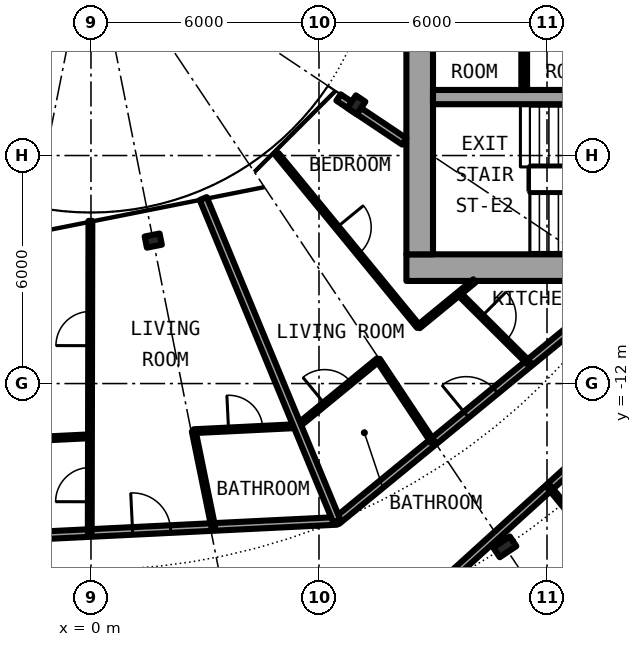
"""IFC4 building model, lengths in metres.
Left out: names, types, materials, properties, quantities, classifications, styles, units other than length and angle.
Written with IfcOpenShell. Run it as: python <this file> out.ifc"""

import sys

from ifc_helpers import new_model, si_unit, direction, frame, frame_2d, origin, origin_2d, place, context, subcontext, project, spatial, rectangle, i_section, extrude, element, fill, save


model = new_model("IFC4")
c1 = context("Model", 3, precision=1e-05, world=origin(), true_north=direction((0.0, 1.0)))
c2 = subcontext(c1, "Body", "Model", "MODEL_VIEW")
j1 = project(units=[si_unit("LENGTHUNIT", "METRE"), si_unit("PLANEANGLEUNIT", "RADIAN")], contexts=[c1])
p1 = place(None, origin())
s1 = spatial("IfcSite", under=j1, at=p1, CompositionType="ELEMENT")
p2 = place(p1, origin())
s2 = spatial("IfcBuilding", under=s1, at=p2, CompositionType="ELEMENT")
p3 = place(p2, frame((0.0, 0.0, 81.9)))
s3 = spatial("IfcBuildingStorey", under=s2, at=p3, CompositionType="ELEMENT", Elevation=81.9)
p4 = place(p3, frame((10.889, -16.297, 0.0), z_axis=(0.0, 0.0, 1.0), x_axis=(0.55557023302, -0.831469612303, 0.0)))
e1 = element("IfcColumn", 1, at=p4, inside=s3, PredefinedType="COLUMN", context=c2, shape_type="SweptSolid", body=[
    extrude(i_section(OverallWidth=0.306, OverallDepth=0.524, WebThickness=0.021, FlangeThickness=0.04, FilletRadius=0.027, at=origin_2d()), origin(), (0.0, 0.0, 1.0), 3.05),
])
for number, where, z_axis, x_axis in (
    (2, (1.639, -8.239, 0.0), (0.0, 0.0, 1.0), (0.195, -0.981, 0.0)),
    (3, (6.984, -4.667, 0.0), (0.0, 0.0, 1.0), (0.831, -0.556, 0.0)),
):
    element("IfcColumn", number, at=place(p3, frame(where, z_axis=z_axis, x_axis=x_axis)), inside=s3, PredefinedType="COLUMN", context=c2, shape_type="SweptSolid", body=[
        extrude(i_section(OverallWidth=0.3, OverallDepth=0.4, WebThickness=0.013, FlangeThickness=0.024, FilletRadius=0.027, at=origin_2d()), origin(), (0.0, 0.0, 1.0), 3.05),
    ])
p5 = place(p3, frame((8.3, -8.95, 0.0), z_axis=(0.0, 0.0, 1.0), x_axis=(1.0, 0.0, 0.0)))
e4 = element("IfcWall", 4, at=p5, inside=s3, PredefinedType="SHEAR", context=c2, shape_type="SweptSolid", body=[
    extrude(rectangle(XDim=14.0, YDim=0.7, at=frame_2d((7.0, 0.0))), origin(), (0.0, 0.0, 1.0), 3.05),
])
p6 = place(p5, frame((11.575, 0.0, 0.0)))
e5 = element("IfcOpeningElement", 5, at=p6, cuts=e4, PredefinedType="OPENING", context=c2, shape_type="SweptSolid", body=[
    extrude(rectangle(XDim=1.2, YDim=2.3, at=frame_2d((0.6, 1.15))), frame((0.0, 0.36, 0.0), z_axis=(0.0, -1.0, 0.0), x_axis=(1.0, 0.0, 0.0)), (0.0, 0.0, 1.0), 0.72),
])
p7 = place(p3, frame((8.65, -8.6, 0.0), z_axis=(0.0, 0.0, 1.0), x_axis=(0.0, 1.0, 0.0)))
e6 = element("IfcWall", 6, at=p7, inside=s3, PredefinedType="SHEAR", context=c2, shape_type="SweptSolid", body=[
    extrude(rectangle(XDim=17.2, YDim=0.7, at=frame_2d((8.6, 0.0))), origin(), (0.0, 0.0, 1.0), 3.05),
])
p8 = place(p7, frame((7.4, 0.0, 0.1)))
e7 = element("IfcOpeningElement", 7, at=p8, cuts=e6, PredefinedType="OPENING", context=c2, shape_type="SweptSolid", body=[
    extrude(rectangle(XDim=2.4, YDim=2.2, at=frame_2d((1.2, 1.1))), frame((0.0, 0.36, 0.0), z_axis=(0.0, -1.0, 0.0), x_axis=(1.0, 0.0, 0.0)), (0.0, 0.0, 1.0), 0.72),
])
p9 = place(p3, frame((9.0, -4.462, 0.0), z_axis=(0.0, 0.0, 1.0), x_axis=(1.0, 0.0, 0.0)))
e8 = element("IfcWall", 8, at=p9, inside=s3, PredefinedType="SHEAR", context=c2, shape_type="SweptSolid", body=[
    extrude(rectangle(XDim=10.15, YDim=0.375, at=frame_2d((5.075, 0.0))), origin(), (0.0, 0.0, 1.0), 3.05),
])
p10 = place(p3, frame((11.4, -1.825, 0.0), z_axis=(0.0, 0.0, 1.0), x_axis=(0.0, -1.0, 0.0)))
e9 = element("IfcWall", 9, at=p10, inside=s3, PredefinedType="PARTITIONING", context=c2, shape_type="SweptSolid", body=[
    extrude(rectangle(XDim=2.45, YDim=0.15, at=frame_2d((1.225, 0.0))), origin(), (0.0, 0.0, 1.0), 2.7),
])
p11 = place(p3, frame((10.513, -19.668, 0.0), z_axis=(0.0, 0.0, 1.0), x_axis=(0.74092137325, 0.671591779775, 0.0)))
e10 = element("IfcWall", 10, at=p11, inside=s3, PredefinedType="PARTITIONING", context=c2, shape_type="SweptSolid", body=[
    extrude(rectangle(XDim=4.342, YDim=0.1, at=frame_2d((2.171, 0.0))), origin(), (0.0, 0.0, 1.0), 2.7),
])
p12 = place(p3, frame((9.239, -17.286, 0.0), z_axis=(0.0, 0.0, 1.0), x_axis=(0.740909940942, 0.671604392044, 0.0)))
e11 = element("IfcWall", 11, at=p12, inside=s3, PredefinedType="PARTITIONING", context=c2, shape_type="SweptSolid", body=[
    extrude(rectangle(XDim=9.367, YDim=0.2, at=frame_2d((4.683, 0.0))), origin(), (0.0, 0.0, 1.0), 2.38),
])
p13 = place(p12, frame((5.215, 0.0, 0.0)))
e12 = element("IfcOpeningElement", 12, at=p13, cuts=e11, PredefinedType="OPENING", context=c2, shape_type="SweptSolid", body=[
    extrude(rectangle(XDim=1.0, YDim=2.3, at=frame_2d((0.5, 1.15))), frame((0.0, 0.11, 0.0), z_axis=(0.0, -1.0, 0.0), x_axis=(1.0, 0.0, 0.0)), (0.0, 0.0, 1.0), 0.22),
])
p14 = place(p3, frame((6.467, -15.614, 0.0), z_axis=(0.0, 0.0, 1.0), x_axis=(0.773074935257, 0.634314704605, 0.0)))
e13 = element("IfcWall", 13, at=p14, inside=s3, PredefinedType="PARTITIONING", context=c2, shape_type="SweptSolid", body=[
    extrude(rectangle(XDim=9.809, YDim=0.2, at=frame_2d((4.904, 0.0))), origin(), (0.0, 0.0, 1.0), 2.7),
])
p15 = place(p14, frame((4.407, 0.0, 0.0)))
e14 = element("IfcOpeningElement", 14, at=p15, cuts=e13, PredefinedType="OPENING", context=c2, shape_type="SweptSolid", body=[
    extrude(rectangle(XDim=1.0, YDim=2.3, at=frame_2d((0.5, 1.15))), frame((0.0, 0.11, 0.0), z_axis=(0.0, -1.0, 0.0), x_axis=(1.0, 0.0, 0.0)), (0.0, 0.0, 1.0), 0.22),
])
p16 = place(p3, frame((-4.906, -16.172, 0.0), z_axis=(0.0, 0.0, 1.0), x_axis=(0.998798520108, 0.049005267363, 0.0)))
e15 = element("IfcWall", 15, at=p16, inside=s3, PredefinedType="PARTITIONING", context=c2, shape_type="SweptSolid", body=[
    extrude(rectangle(XDim=11.389, YDim=0.2, at=frame_2d((5.694, 0.0))), origin(), (0.0, 0.0, 1.0), 2.7),
])
p17 = place(p16, frame((6.008, 0.0, 0.0)))
e16 = element("IfcOpeningElement", 16, at=p17, cuts=e15, PredefinedType="OPENING", context=c2, shape_type="SweptSolid", body=[
    extrude(rectangle(XDim=1.0, YDim=2.3, at=frame_2d((0.5, 1.15))), frame((0.0, 0.11, 0.0), z_axis=(0.0, -1.0, 0.0), x_axis=(1.0, 0.0, 0.0)), (0.0, 0.0, 1.0), 0.22),
])
p18 = place(p3, frame((5.434, -13.119, 0.0), z_axis=(0.0, 0.0, 1.0), x_axis=(0.773049907698, 0.634345205868, 0.0)))
e17 = element("IfcWall", 17, at=p18, inside=s3, PredefinedType="PARTITIONING", context=c2, shape_type="SweptSolid", body=[
    extrude(rectangle(XDim=2.748, YDim=0.1, at=frame_2d((1.374, 0.0))), origin(), (0.0, 0.0, 1.0), 2.7),
])
p19 = place(p18, frame((0.924, 0.0, 0.0)))
e18 = element("IfcOpeningElement", 18, at=p19, cuts=e17, PredefinedType="OPENING", context=c2, shape_type="SweptSolid", body=[
    extrude(rectangle(XDim=0.9, YDim=2.3, at=frame_2d((0.45, 1.15))), frame((0.0, 0.06, 0.0), z_axis=(0.0, -1.0, 0.0), x_axis=(1.0, 0.0, 0.0)), (0.0, 0.0, 1.0), 0.12),
])
p20 = place(p3, frame((8.62, -10.505, 0.0), z_axis=(0.0, 0.0, 1.0), x_axis=(0.772957368531, 0.6344579627, 0.0)))
e19 = element("IfcWall", 19, at=p20, inside=s3, PredefinedType="PARTITIONING", context=c2, shape_type="SweptSolid", body=[
    extrude(rectangle(XDim=1.906, YDim=0.1, at=frame_2d((0.953, 0.0))), origin(), (0.0, 0.0, 1.0), 2.7),
])
p21 = place(p3, frame((-4.125, -13.588, 0.0), z_axis=(0.0, 0.0, 1.0), x_axis=(0.998798386358, 0.049007993321, 0.0)))
e20 = element("IfcWall", 20, at=p21, inside=s3, PredefinedType="PARTITIONING", context=c2, shape_type="SweptSolid", body=[
    extrude(rectangle(XDim=4.1, YDim=0.1, at=frame_2d((2.05, 0.0))), origin(), (0.0, 0.0, 1.0), 2.7),
])
p22 = place(p3, frame((2.704, -13.253, 0.0), z_axis=(0.0, 0.0, 1.0), x_axis=(0.998796928508, 0.049037695739, 0.0)))
e21 = element("IfcWall", 21, at=p22, inside=s3, PredefinedType="PARTITIONING", context=c2, shape_type="SweptSolid", body=[
    extrude(rectangle(XDim=2.733, YDim=0.1, at=frame_2d((1.367, 0.0))), origin(), (0.0, 0.0, 1.0), 2.7),
])
p23 = place(p22, frame((0.917, 0.0, 0.0)))
e22 = element("IfcOpeningElement", 22, at=p23, cuts=e21, PredefinedType="OPENING", context=c2, shape_type="SweptSolid", body=[
    extrude(rectangle(XDim=0.9, YDim=2.3, at=frame_2d((0.45, 1.15))), frame((0.0, 0.06, 0.0), z_axis=(0.0, -1.0, 0.0), x_axis=(1.0, 0.0, 0.0)), (0.0, 0.0, 1.0), 0.12),
])
p24 = place(p3, frame((6.513, -4.472, 0.0), z_axis=(0.0, 0.0, 1.0), x_axis=(0.831382204863, -0.555701025225, 0.0)))
e23 = element("IfcWall", 23, at=p24, inside=s3, PredefinedType="PARTITIONING", context=c2, shape_type="SweptSolid", body=[
    extrude(rectangle(XDim=2.082, YDim=0.2, at=frame_2d((1.041, 0.0))), origin(), (0.0, 0.0, 1.0), 2.7),
])
p25 = place(p3, frame((-0.032, -15.933, 0.0), z_axis=(0.0, 0.0, 1.0), x_axis=(0.002080789764, 0.999997835155, 0.0)))
e24 = element("IfcWall", 24, at=p25, inside=s3, PredefinedType="PARTITIONING", context=c2, shape_type="SweptSolid", body=[
    extrude(rectangle(XDim=8.213, YDim=0.1, at=frame_2d((4.106, 0.0))), origin(), (0.0, 0.0, 1.0), 2.7),
])
p26 = place(p25, frame((0.823, 0.0, 0.0)))
e25 = element("IfcOpeningElement", 25, at=p26, cuts=e24, PredefinedType="OPENING", context=c2, shape_type="SweptSolid", body=[
    extrude(rectangle(XDim=0.9, YDim=2.3, at=frame_2d((0.45, 1.15))), frame((0.0, 0.06, 0.0), z_axis=(0.0, -1.0, 0.0), x_axis=(1.0, 0.0, 0.0)), (0.0, 0.0, 1.0), 0.12),
])
p27 = place(p25, frame((4.93, 0.0, 0.0)))
e26 = element("IfcOpeningElement", 26, at=p27, cuts=e24, PredefinedType="OPENING", context=c2, shape_type="SweptSolid", body=[
    extrude(rectangle(XDim=0.9, YDim=2.3, at=frame_2d((0.45, 1.15))), frame((0.0, 0.06, 0.0), z_axis=(0.0, -1.0, 0.0), x_axis=(1.0, 0.0, 0.0)), (0.0, 0.0, 1.0), 0.12),
])
p28 = place(p3, frame((2.704, -13.253, 0.0), z_axis=(0.0, 0.0, 1.0), x_axis=(0.199820523641, -0.979832515449, 0.0)))
e27 = element("IfcWall", 27, at=p28, inside=s3, PredefinedType="PARTITIONING", context=c2, shape_type="SweptSolid", body=[
    extrude(rectangle(XDim=2.572, YDim=0.1, at=frame_2d((1.286, 0.0))), origin(), (0.0, 0.0, 1.0), 2.7),
])
p29 = place(p3, frame((2.954, -7.132, 0.0), z_axis=(0.0, 0.0, 1.0), x_axis=(0.382646942224, -0.923894646378, 0.0)))
e28 = element("IfcWall", 28, at=p29, inside=s3, PredefinedType="PARTITIONING", context=c2, shape_type="SweptSolid", body=[
    extrude(rectangle(XDim=9.181, YDim=0.2, at=frame_2d((4.59, 0.0))), origin(), (0.0, 0.0, 1.0), 2.7),
])
p30 = place(p3, frame((4.898, -5.968, 0.0), z_axis=(0.0, 0.0, 1.0), x_axis=(0.634358693064, -0.773038840249, 0.0)))
e29 = element("IfcWall", 29, at=p30, inside=s3, PredefinedType="PARTITIONING", context=c2, shape_type="SweptSolid", body=[
    extrude(rectangle(XDim=5.868, YDim=0.1, at=frame_2d((2.934, 0.0))), origin(), (0.0, 0.0, 1.0), 2.7),
])
p31 = place(p30, frame((2.484, 0.0, 0.0)))
e30 = element("IfcOpeningElement", 30, at=p31, cuts=e29, PredefinedType="OPENING", context=c2, shape_type="SweptSolid", body=[
    extrude(rectangle(XDim=0.9, YDim=2.3, at=frame_2d((0.45, 1.15))), frame((0.0, 0.06, 0.0), z_axis=(0.0, -1.0, 0.0), x_axis=(1.0, 0.0, 0.0)), (0.0, 0.0, 1.0), 0.12),
])
p32 = place(p3, frame((7.558, -11.376, 0.0), z_axis=(0.0, 0.0, 1.0), x_axis=(0.553615197403, -0.83277260594, 0.0)))
e31 = element("IfcWall", 31, at=p32, inside=s3, PredefinedType="PARTITIONING", context=c2, shape_type="SweptSolid", body=[
    extrude(rectangle(XDim=2.597, YDim=0.1, at=frame_2d((1.299, 0.0))), origin(), (0.0, 0.0, 1.0), 2.7),
])
p33 = place(p3, frame((9.683, -9.632, 0.0), z_axis=(0.0, 0.0, 1.0), x_axis=(0.708796844581, -0.705412668665, 0.0)))
e32 = element("IfcWall", 32, at=p33, inside=s3, PredefinedType="PARTITIONING", context=c2, shape_type="SweptSolid", body=[
    extrude(rectangle(XDim=2.597, YDim=0.1, at=frame_2d((1.299, 0.0))), origin(), (0.0, 0.0, 1.0), 2.7),
])
p34 = place(p33, frame((0.849, 0.0, 0.0)))
e33 = element("IfcOpeningElement", 33, at=p34, cuts=e32, PredefinedType="OPENING", context=c2, shape_type="SweptSolid", body=[
    extrude(rectangle(XDim=0.9, YDim=2.3, at=frame_2d((0.45, 1.15))), frame((0.0, 0.06, 0.0), z_axis=(0.0, -1.0, 0.0), x_axis=(1.0, 0.0, 0.0)), (0.0, 0.0, 1.0), 0.12),
])
p35 = place(p3, frame((12.062, -14.727, 0.0), z_axis=(0.0, 0.0, 1.0), x_axis=(0.633664062855, -0.773608334654, 0.0)))
e34 = element("IfcWall", 34, at=p35, inside=s3, PredefinedType="PARTITIONING", context=c2, shape_type="SweptSolid", body=[
    extrude(rectangle(XDim=8.138, YDim=0.1, at=frame_2d((4.069, 0.0))), origin(), (0.0, 0.0, 1.0), 2.7),
])
p36 = place(p35, frame((0.861, 0.0, 0.0)))
e35 = element("IfcOpeningElement", 35, at=p36, cuts=e34, PredefinedType="OPENING", context=c2, shape_type="SweptSolid", body=[
    extrude(rectangle(XDim=0.9, YDim=2.3, at=frame_2d((0.45, 1.15))), frame((0.0, 0.06, 0.0), z_axis=(0.0, -1.0, 0.0), x_axis=(1.0, 0.0, 0.0)), (0.0, 0.0, 1.0), 0.12),
])
p37 = place(p35, frame((4.931, 0.0, 0.0)))
e36 = element("IfcOpeningElement", 36, at=p37, cuts=e34, PredefinedType="OPENING", context=c2, shape_type="SweptSolid", body=[
    extrude(rectangle(XDim=0.9, YDim=2.3, at=frame_2d((0.45, 1.15))), frame((0.0, 0.06, 0.0), z_axis=(0.0, -1.0, 0.0), x_axis=(1.0, 0.0, 0.0)), (0.0, 0.0, 1.0), 0.12),
])
p38 = place(p17, origin())
e37 = element("IfcDoor", 37, at=p38, inside=s3, OperationType="SINGLE_SWING_RIGHT", PredefinedType="DOOR", context=c2, shape_type="SweptSolid", body=[
    extrude(rectangle(XDim=1.0, YDim=2.3, at=frame_2d((0.5, 1.15))), frame((0.0, 0.025, 0.0), z_axis=(0.0, -1.0, 0.0), x_axis=(1.0, 0.0, 0.0)), (0.0, 0.0, 1.0), 0.05),
])
fill(e16, e37)
p39 = place(p23, origin())
e38 = element("IfcDoor", 38, at=p39, inside=s3, OperationType="SINGLE_SWING_RIGHT", PredefinedType="DOOR", context=c2, shape_type="SweptSolid", body=[
    extrude(rectangle(XDim=0.9, YDim=2.3, at=frame_2d((0.45, 1.15))), frame((0.0, 0.025, 0.0), z_axis=(0.0, -1.0, 0.0), x_axis=(1.0, 0.0, 0.0)), (0.0, 0.0, 1.0), 0.05),
])
fill(e22, e38)
p40 = place(p26, origin())
e39 = element("IfcDoor", 39, at=p40, inside=s3, OperationType="SINGLE_SWING_LEFT", PredefinedType="DOOR", context=c2, shape_type="SweptSolid", body=[
    extrude(rectangle(XDim=0.9, YDim=2.3, at=frame_2d((0.45, 1.15))), frame((0.0, 0.025, 0.0), z_axis=(0.0, -1.0, 0.0), x_axis=(1.0, 0.0, 0.0)), (0.0, 0.0, 1.0), 0.05),
])
fill(e25, e39)
p41 = place(p27, origin())
e40 = element("IfcDoor", 40, at=p41, inside=s3, OperationType="SINGLE_SWING_RIGHT", PredefinedType="DOOR", context=c2, shape_type="SweptSolid", body=[
    extrude(rectangle(XDim=0.9, YDim=2.3, at=frame_2d((0.45, 1.15))), frame((0.0, 0.025, 0.0), z_axis=(0.0, -1.0, 0.0), x_axis=(1.0, 0.0, 0.0)), (0.0, 0.0, 1.0), 0.05),
])
fill(e26, e40)
p42 = place(p15, origin())
e41 = element("IfcDoor", 41, at=p42, inside=s3, OperationType="SINGLE_SWING_RIGHT", PredefinedType="DOOR", context=c2, shape_type="SweptSolid", body=[
    extrude(rectangle(XDim=1.0, YDim=2.3, at=frame_2d((0.5, 1.15))), frame((0.0, 0.025, 0.0), z_axis=(0.0, -1.0, 0.0), x_axis=(1.0, 0.0, 0.0)), (0.0, 0.0, 1.0), 0.05),
])
fill(e14, e41)
p43 = place(p19, origin())
e42 = element("IfcDoor", 42, at=p43, inside=s3, OperationType="SINGLE_SWING_RIGHT", PredefinedType="DOOR", context=c2, shape_type="SweptSolid", body=[
    extrude(rectangle(XDim=0.9, YDim=2.3, at=frame_2d((0.45, 1.15))), frame((0.0, 0.025, 0.0), z_axis=(0.0, -1.0, 0.0), x_axis=(1.0, 0.0, 0.0)), (0.0, 0.0, 1.0), 0.05),
])
fill(e18, e42)
p44 = place(p34, origin())
e43 = element("IfcDoor", 43, at=p44, inside=s3, OperationType="SINGLE_SWING_RIGHT", PredefinedType="DOOR", context=c2, shape_type="SweptSolid", body=[
    extrude(rectangle(XDim=0.9, YDim=2.3, at=frame_2d((0.45, 1.15))), frame((0.0, 0.025, 0.0), z_axis=(0.0, -1.0, 0.0), x_axis=(1.0, 0.0, 0.0)), (0.0, 0.0, 1.0), 0.05),
])
fill(e33, e43)
p45 = place(p31, origin())
e44 = element("IfcDoor", 44, at=p45, inside=s3, OperationType="SINGLE_SWING_LEFT", PredefinedType="DOOR", context=c2, shape_type="SweptSolid", body=[
    extrude(rectangle(XDim=0.9, YDim=2.3, at=frame_2d((0.45, 1.15))), frame((0.0, 0.025, 0.0), z_axis=(0.0, -1.0, 0.0), x_axis=(1.0, 0.0, 0.0)), (0.0, 0.0, 1.0), 0.05),
])
fill(e30, e44)
save(model, sys.argv[1])
